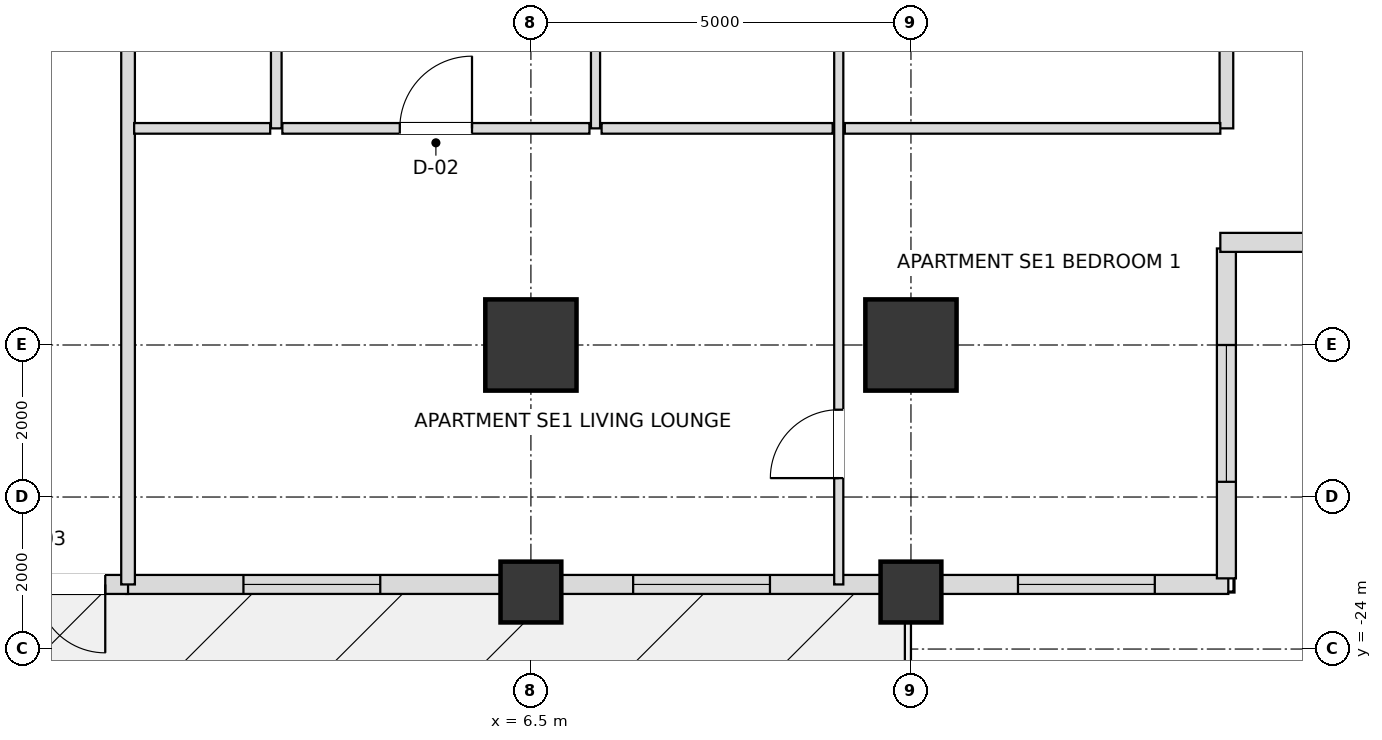
"""IFC4 building model, lengths in metres.
Left out: names, types, materials, properties, quantities, classifications, styles, units other than length and angle.
Written with IfcOpenShell. Run it as: python <this file> out.ifc"""

import sys

from ifc_helpers import new_model, si_unit, direction, frame, frame_2d, origin, origin_2d, place, context, subcontext, project, spatial, rectangle, extrude, element, fill, save


model = new_model("IFC4")
c1 = context("Model", 3, precision=1e-05, world=origin(), true_north=direction((0.0, 1.0)))
c2 = subcontext(c1, "Body", "Model", "MODEL_VIEW")
j1 = project(units=[si_unit("LENGTHUNIT", "METRE"), si_unit("PLANEANGLEUNIT", "RADIAN")], contexts=[c1])
p1 = place(None, origin())
s1 = spatial("IfcSite", under=j1, at=p1, CompositionType="ELEMENT")
p2 = place(p1, origin())
s2 = spatial("IfcBuilding", under=s1, at=p2, CompositionType="ELEMENT")
p3 = place(p2, frame((0.0, 0.0, 99.0)))
s3 = spatial("IfcBuildingStorey", under=s2, at=p3, CompositionType="ELEMENT", Elevation=99.0)
for number, where, z_axis, x_axis in (
    (1, (6.5, -20.0, 0.0), (0.0, 0.0, 1.0), (1.0, 0.0, 0.0)),
    (2, (11.5, -20.0, 0.0), (0.0, 0.0, 1.0), (1.0, 0.0, 0.0)),
):
    element("IfcColumn", number, at=place(p3, frame(where, z_axis=z_axis, x_axis=x_axis)), inside=s3, PredefinedType="USERDEFINED", context=c2, shape_type="SweptSolid", body=[
        extrude(rectangle(XDim=1.2, YDim=1.2, at=origin_2d()), origin(), (0.0, 0.0, 1.0), 3.6),
    ])
for number, where, z_axis, x_axis in (
    (3, (6.5, -23.25, 0.0), (0.0, 0.0, 1.0), (1.0, 0.0, 0.0)),
    (4, (11.5, -23.25, 0.0), (0.0, 0.0, 1.0), (1.0, 0.0, 0.0)),
):
    element("IfcColumn", number, at=place(p3, frame(where, z_axis=z_axis, x_axis=x_axis)), inside=s3, PredefinedType="COLUMN", context=c2, shape_type="SweptSolid", body=[
        extrude(rectangle(XDim=0.8, YDim=0.8, at=origin_2d()), origin(), (0.0, 0.0, 1.0), 3.6),
    ])
p4 = place(p3, frame((1.175, -23.15, 0.0), z_axis=(0.0, 0.0, 1.0), x_axis=(1.0, 0.0, 0.0)))
e5 = element("IfcWall", 5, at=p4, inside=s3, PredefinedType="SOLIDWALL", context=c2, shape_type="SweptSolid", body=[
    extrude(rectangle(XDim=4.93, YDim=0.25, at=frame_2d((2.465, 0.0))), origin(), (0.0, 0.0, 1.0), 2.736),
])
p5 = place(p4, frame((1.543, 0.0, 0.72)))
e6 = element("IfcOpeningElement", 6, at=p5, cuts=e5, PredefinedType="OPENING", context=c2, shape_type="SweptSolid", body=[
    extrude(rectangle(XDim=1.8, YDim=1.68, at=frame_2d((0.9, 0.84))), frame((0.0, 0.135, 0.0), z_axis=(0.0, -1.0, 0.0), x_axis=(1.0, 0.0, 0.0)), (0.0, 0.0, 1.0), 0.27),
])
p6 = place(p3, frame((6.895, -23.15, 0.0), z_axis=(0.0, 0.0, 1.0), x_axis=(1.0, 0.0, 0.0)))
e7 = element("IfcWall", 7, at=p6, inside=s3, PredefinedType="SOLIDWALL", context=c2, shape_type="SweptSolid", body=[
    extrude(rectangle(XDim=4.21, YDim=0.25, at=frame_2d((2.105, 0.0))), origin(), (0.0, 0.0, 1.0), 2.736),
])
p7 = place(p6, frame((0.95, 0.0, 0.72)))
e8 = element("IfcOpeningElement", 8, at=p7, cuts=e7, PredefinedType="OPENING", context=c2, shape_type="SweptSolid", body=[
    extrude(rectangle(XDim=1.8, YDim=1.68, at=frame_2d((0.9, 0.84))), frame((0.0, 0.135, 0.0), z_axis=(0.0, -1.0, 0.0), x_axis=(1.0, 0.0, 0.0)), (0.0, 0.0, 1.0), 0.27),
])
p8 = place(p3, frame((11.895, -23.15, 0.0), z_axis=(0.0, 0.0, 1.0), x_axis=(1.0, 0.0, 0.0)))
e9 = element("IfcWall", 9, at=p8, inside=s3, PredefinedType="SOLIDWALL", context=c2, shape_type="SweptSolid", body=[
    extrude(rectangle(XDim=3.78, YDim=0.25, at=frame_2d((1.89, 0.0))), origin(), (0.0, 0.0, 1.0), 2.736),
])
p9 = place(p8, frame((1.013, 0.0, 0.72)))
e10 = element("IfcOpeningElement", 10, at=p9, cuts=e9, PredefinedType="OPENING", context=c2, shape_type="SweptSolid", body=[
    extrude(rectangle(XDim=1.8, YDim=1.68, at=frame_2d((0.9, 0.84))), frame((0.0, 0.135, 0.0), z_axis=(0.0, -1.0, 0.0), x_axis=(1.0, 0.0, 0.0)), (0.0, 0.0, 1.0), 0.27),
])
p10 = place(p3, frame((1.2, -23.15, 0.0), z_axis=(0.0, 0.0, 1.0), x_axis=(-1.0, 0.0, 0.0)))
e11 = element("IfcWall", 11, at=p10, inside=s3, PredefinedType="SOLIDWALL", context=c2, shape_type="SweptSolid", body=[
    extrude(rectangle(XDim=2.4, YDim=0.25, at=frame_2d((1.2, 0.0))), origin(), (0.0, 0.0, 1.0), 2.736),
])
p11 = place(p10, frame((0.3, 0.0, 0.0)))
e12 = element("IfcOpeningElement", 12, at=p11, cuts=e11, PredefinedType="OPENING", context=c2, shape_type="SweptSolid", body=[
    extrude(rectangle(XDim=1.8, YDim=2.3, at=frame_2d((0.9, 1.15))), frame((0.0, 0.135, 0.0), z_axis=(0.0, -1.0, 0.0), x_axis=(1.0, 0.0, 0.0)), (0.0, 0.0, 1.0), 0.27),
])
p12 = place(p3, frame((15.65, -23.07, 0.0), z_axis=(0.0, 0.0, 1.0), x_axis=(0.0, 1.0, 0.0)))
e13 = element("IfcWall", 13, at=p12, inside=s3, PredefinedType="SOLIDWALL", context=c2, shape_type="SweptSolid", body=[
    extrude(rectangle(XDim=4.34, YDim=0.25, at=frame_2d((2.17, 0.0))), origin(), (0.0, 0.0, 1.0), 2.736),
])
p13 = place(p12, frame((1.27, 0.0, 0.72)))
e14 = element("IfcOpeningElement", 14, at=p13, cuts=e13, PredefinedType="OPENING", context=c2, shape_type="SweptSolid", body=[
    extrude(rectangle(XDim=1.8, YDim=1.68, at=frame_2d((0.9, 0.84))), frame((0.0, 0.135, 0.0), z_axis=(0.0, -1.0, 0.0), x_axis=(1.0, 0.0, 0.0)), (0.0, 0.0, 1.0), 0.27),
])
p14 = place(p3, frame((15.57, -18.65, 0.0), z_axis=(0.0, 0.0, 1.0), x_axis=(1.0, 0.0, 0.0)))
e15 = element("IfcWall", 15, at=p14, inside=s3, PredefinedType="SOLIDWALL", context=c2, shape_type="SweptSolid", body=[
    extrude(rectangle(XDim=4.66, YDim=0.25, at=frame_2d((2.33, 0.0))), origin(), (0.0, 0.0, 1.0), 2.736),
])
p15 = place(p14, frame((1.43, 0.0, 0.72)))
e16 = element("IfcOpeningElement", 16, at=p15, cuts=e15, PredefinedType="OPENING", context=c2, shape_type="SweptSolid", body=[
    extrude(rectangle(XDim=1.8, YDim=1.68, at=frame_2d((0.9, 0.84))), frame((0.0, 0.135, 0.0), z_axis=(0.0, -1.0, 0.0), x_axis=(1.0, 0.0, 0.0)), (0.0, 0.0, 1.0), 0.27),
])
p16 = place(p3, frame((1.2, -23.15, 0.0), z_axis=(0.0, 0.0, 1.0), x_axis=(0.0, 1.0, 0.0)))
e17 = element("IfcWall", 17, at=p16, inside=s3, PredefinedType="PARTITIONING", context=c2, shape_type="SweptSolid", body=[
    extrude(rectangle(XDim=13.85, YDim=0.18, at=frame_2d((6.925, 0.0))), origin(), (0.0, 0.0, 1.0), 2.816),
])
p17 = place(p3, frame((3.15, -17.15, 0.0), z_axis=(0.0, 0.0, 1.0), x_axis=(0.0, 1.0, 0.0)))
e18 = element("IfcWall", 18, at=p17, inside=s3, PredefinedType="PARTITIONING", context=c2, shape_type="SweptSolid", body=[
    extrude(rectangle(XDim=7.85, YDim=0.14, at=frame_2d((3.925, 0.0))), origin(), (0.0, 0.0, 1.0), 3.38),
])
p18 = place(p17, frame((3.48, 0.0, 0.0)))
e19 = element("IfcOpeningElement", 19, at=p18, cuts=e18, PredefinedType="OPENING", context=c2, shape_type="SweptSolid", body=[
    extrude(rectangle(XDim=0.9, YDim=2.1, at=frame_2d((0.45, 1.05))), frame((0.0, 0.08, 0.0), z_axis=(0.0, -1.0, 0.0), x_axis=(1.0, 0.0, 0.0)), (0.0, 0.0, 1.0), 0.16),
])
p19 = place(p3, frame((7.35, -17.15, 0.0), z_axis=(0.0, 0.0, 1.0), x_axis=(0.0, 1.0, 0.0)))
e20 = element("IfcWall", 20, at=p19, inside=s3, PredefinedType="PARTITIONING", context=c2, shape_type="SweptSolid", body=[
    extrude(rectangle(XDim=7.85, YDim=0.12, at=frame_2d((3.925, 0.0))), origin(), (0.0, 0.0, 1.0), 2.816),
])
p20 = place(p19, frame((3.455, 0.0, 0.0)))
e21 = element("IfcOpeningElement", 21, at=p20, cuts=e20, PredefinedType="OPENING", context=c2, shape_type="SweptSolid", body=[
    extrude(rectangle(XDim=0.95, YDim=2.1, at=frame_2d((0.475, 1.05))), frame((0.0, 0.07, 0.0), z_axis=(0.0, -1.0, 0.0), x_axis=(1.0, 0.0, 0.0)), (0.0, 0.0, 1.0), 0.14),
])
p21 = place(p3, frame((10.55, -23.15, 0.0), z_axis=(0.0, 0.0, 1.0), x_axis=(0.0, 1.0, 0.0)))
e22 = element("IfcWall", 22, at=p21, inside=s3, PredefinedType="PARTITIONING", context=c2, shape_type="SweptSolid", body=[
    extrude(rectangle(XDim=13.85, YDim=0.12, at=frame_2d((6.925, 0.0))), origin(), (0.0, 0.0, 1.0), 2.816),
])
p22 = place(p21, frame((8.681, 0.0, 0.0)))
e23 = element("IfcOpeningElement", 23, at=p22, cuts=e22, PredefinedType="OPENING", context=c2, shape_type="SweptSolid", body=[
    extrude(rectangle(XDim=0.95, YDim=2.1, at=frame_2d((0.475, 1.05))), frame((0.0, 0.07, 0.0), z_axis=(0.0, -1.0, 0.0), x_axis=(1.0, 0.0, 0.0)), (0.0, 0.0, 1.0), 0.14),
])
p23 = place(p21, frame((1.399, 0.0, 0.0)))
e24 = element("IfcOpeningElement", 24, at=p23, cuts=e22, PredefinedType="OPENING", context=c2, shape_type="SweptSolid", body=[
    extrude(rectangle(XDim=0.9, YDim=2.1, at=frame_2d((0.45, 1.05))), frame((0.0, 0.07, 0.0), z_axis=(0.0, -1.0, 0.0), x_axis=(1.0, 0.0, 0.0)), (0.0, 0.0, 1.0), 0.14),
])
p24 = place(p3, frame((15.65, -17.15, 0.0), z_axis=(0.0, 0.0, 1.0), x_axis=(0.0, 1.0, 0.0)))
e25 = element("IfcWall", 25, at=p24, inside=s3, PredefinedType="PARTITIONING", context=c2, shape_type="SweptSolid", body=[
    extrude(rectangle(XDim=7.85, YDim=0.18, at=frame_2d((3.925, 0.0))), origin(), (0.0, 0.0, 1.0), 2.736),
])
p25 = place(p3, frame((1.28, -17.15, 0.0), z_axis=(0.0, 0.0, 1.0), x_axis=(1.0, 0.0, 0.0)))
e26 = element("IfcWall", 26, at=p25, inside=s3, PredefinedType="PARTITIONING", context=c2, shape_type="SweptSolid", body=[
    extrude(rectangle(XDim=1.79, YDim=0.14, at=frame_2d((0.895, 0.0))), origin(), (0.0, 0.0, 1.0), 3.38),
])
p26 = place(p3, frame((3.23, -17.15, 0.0), z_axis=(0.0, 0.0, 1.0), x_axis=(1.0, 0.0, 0.0)))
e27 = element("IfcWall", 27, at=p26, inside=s3, PredefinedType="PARTITIONING", context=c2, shape_type="SweptSolid", body=[
    extrude(rectangle(XDim=4.04, YDim=0.14, at=frame_2d((2.02, 0.0))), origin(), (0.0, 0.0, 1.0), 2.816),
])
p27 = place(p26, frame((1.545, 0.0, 0.0)))
e28 = element("IfcOpeningElement", 28, at=p27, cuts=e27, PredefinedType="OPENING", context=c2, shape_type="SweptSolid", body=[
    extrude(rectangle(XDim=0.95, YDim=2.1, at=frame_2d((0.475, 1.05))), frame((0.0, 0.08, 0.0), z_axis=(0.0, -1.0, 0.0), x_axis=(1.0, 0.0, 0.0)), (0.0, 0.0, 1.0), 0.16),
])
p28 = place(p3, frame((7.43, -17.15, 0.0), z_axis=(0.0, 0.0, 1.0), x_axis=(1.0, 0.0, 0.0)))
e29 = element("IfcWall", 29, at=p28, inside=s3, PredefinedType="PARTITIONING", context=c2, shape_type="SweptSolid", body=[
    extrude(rectangle(XDim=3.04, YDim=0.14, at=frame_2d((1.52, 0.0))), origin(), (0.0, 0.0, 1.0), 3.38),
])
p29 = place(p3, frame((10.63, -17.15, 0.0), z_axis=(0.0, 0.0, 1.0), x_axis=(1.0, 0.0, 0.0)))
e30 = element("IfcWall", 30, at=p29, inside=s3, PredefinedType="PARTITIONING", context=c2, shape_type="SweptSolid", body=[
    extrude(rectangle(XDim=4.94, YDim=0.14, at=frame_2d((2.47, 0.0))), origin(), (0.0, 0.0, 1.0), 2.736),
])
p30 = place(p5, origin())
e31 = element("IfcWindow", 31, at=p30, inside=s3, PartitioningType="SINGLE_PANEL", PredefinedType="WINDOW", context=c2, shape_type="SweptSolid", body=[
    extrude(rectangle(XDim=1.8, YDim=1.68, at=frame_2d((0.9, 0.84))), frame((0.0, 0.03, 0.0), z_axis=(0.0, -1.0, 0.0), x_axis=(1.0, 0.0, 0.0)), (0.0, 0.0, 1.0), 0.06),
])
fill(e6, e31)
p31 = place(p7, origin())
e32 = element("IfcWindow", 32, at=p31, inside=s3, PartitioningType="SINGLE_PANEL", PredefinedType="WINDOW", context=c2, shape_type="SweptSolid", body=[
    extrude(rectangle(XDim=1.8, YDim=1.68, at=frame_2d((0.9, 0.84))), frame((0.0, 0.03, 0.0), z_axis=(0.0, -1.0, 0.0), x_axis=(1.0, 0.0, 0.0)), (0.0, 0.0, 1.0), 0.06),
])
fill(e8, e32)
p32 = place(p9, origin())
e33 = element("IfcWindow", 33, at=p32, inside=s3, PartitioningType="SINGLE_PANEL", PredefinedType="WINDOW", context=c2, shape_type="SweptSolid", body=[
    extrude(rectangle(XDim=1.8, YDim=1.68, at=frame_2d((0.9, 0.84))), frame((0.0, 0.03, 0.0), z_axis=(0.0, -1.0, 0.0), x_axis=(1.0, 0.0, 0.0)), (0.0, 0.0, 1.0), 0.06),
])
fill(e10, e33)
p33 = place(p11, origin())
e34 = element("IfcDoor", 34, at=p33, inside=s3, OperationType="DOUBLE_DOOR_SINGLE_SWING", PredefinedType="DOOR", context=c2, shape_type="SweptSolid", body=[
    extrude(rectangle(XDim=1.8, YDim=2.3, at=frame_2d((0.9, 1.15))), frame((0.0, 0.025, 0.0), z_axis=(0.0, -1.0, 0.0), x_axis=(1.0, 0.0, 0.0)), (0.0, 0.0, 1.0), 0.05),
])
fill(e12, e34)
p34 = place(p13, origin())
e35 = element("IfcWindow", 35, at=p34, inside=s3, PartitioningType="SINGLE_PANEL", PredefinedType="WINDOW", context=c2, shape_type="SweptSolid", body=[
    extrude(rectangle(XDim=1.8, YDim=1.68, at=frame_2d((0.9, 0.84))), frame((0.0, 0.03, 0.0), z_axis=(0.0, -1.0, 0.0), x_axis=(1.0, 0.0, 0.0)), (0.0, 0.0, 1.0), 0.06),
])
fill(e14, e35)
p35 = place(p27, origin())
e36 = element("IfcDoor", 36, at=p35, inside=s3, OperationType="SINGLE_SWING_RIGHT", PredefinedType="DOOR", context=c2, shape_type="SweptSolid", body=[
    extrude(rectangle(XDim=0.95, YDim=2.1, at=frame_2d((0.475, 1.05))), frame((0.0, 0.025, 0.0), z_axis=(0.0, -1.0, 0.0), x_axis=(1.0, 0.0, 0.0)), (0.0, 0.0, 1.0), 0.05),
])
fill(e28, e36)
p36 = place(p23, origin())
e37 = element("IfcDoor", 37, at=p36, inside=s3, OperationType="SINGLE_SWING_LEFT", PredefinedType="DOOR", context=c2, shape_type="SweptSolid", body=[
    extrude(rectangle(XDim=0.9, YDim=2.1, at=frame_2d((0.45, 1.05))), frame((0.0, 0.025, 0.0), z_axis=(0.0, -1.0, 0.0), x_axis=(1.0, 0.0, 0.0)), (0.0, 0.0, 1.0), 0.05),
])
fill(e24, e37)
save(model, sys.argv[1])
